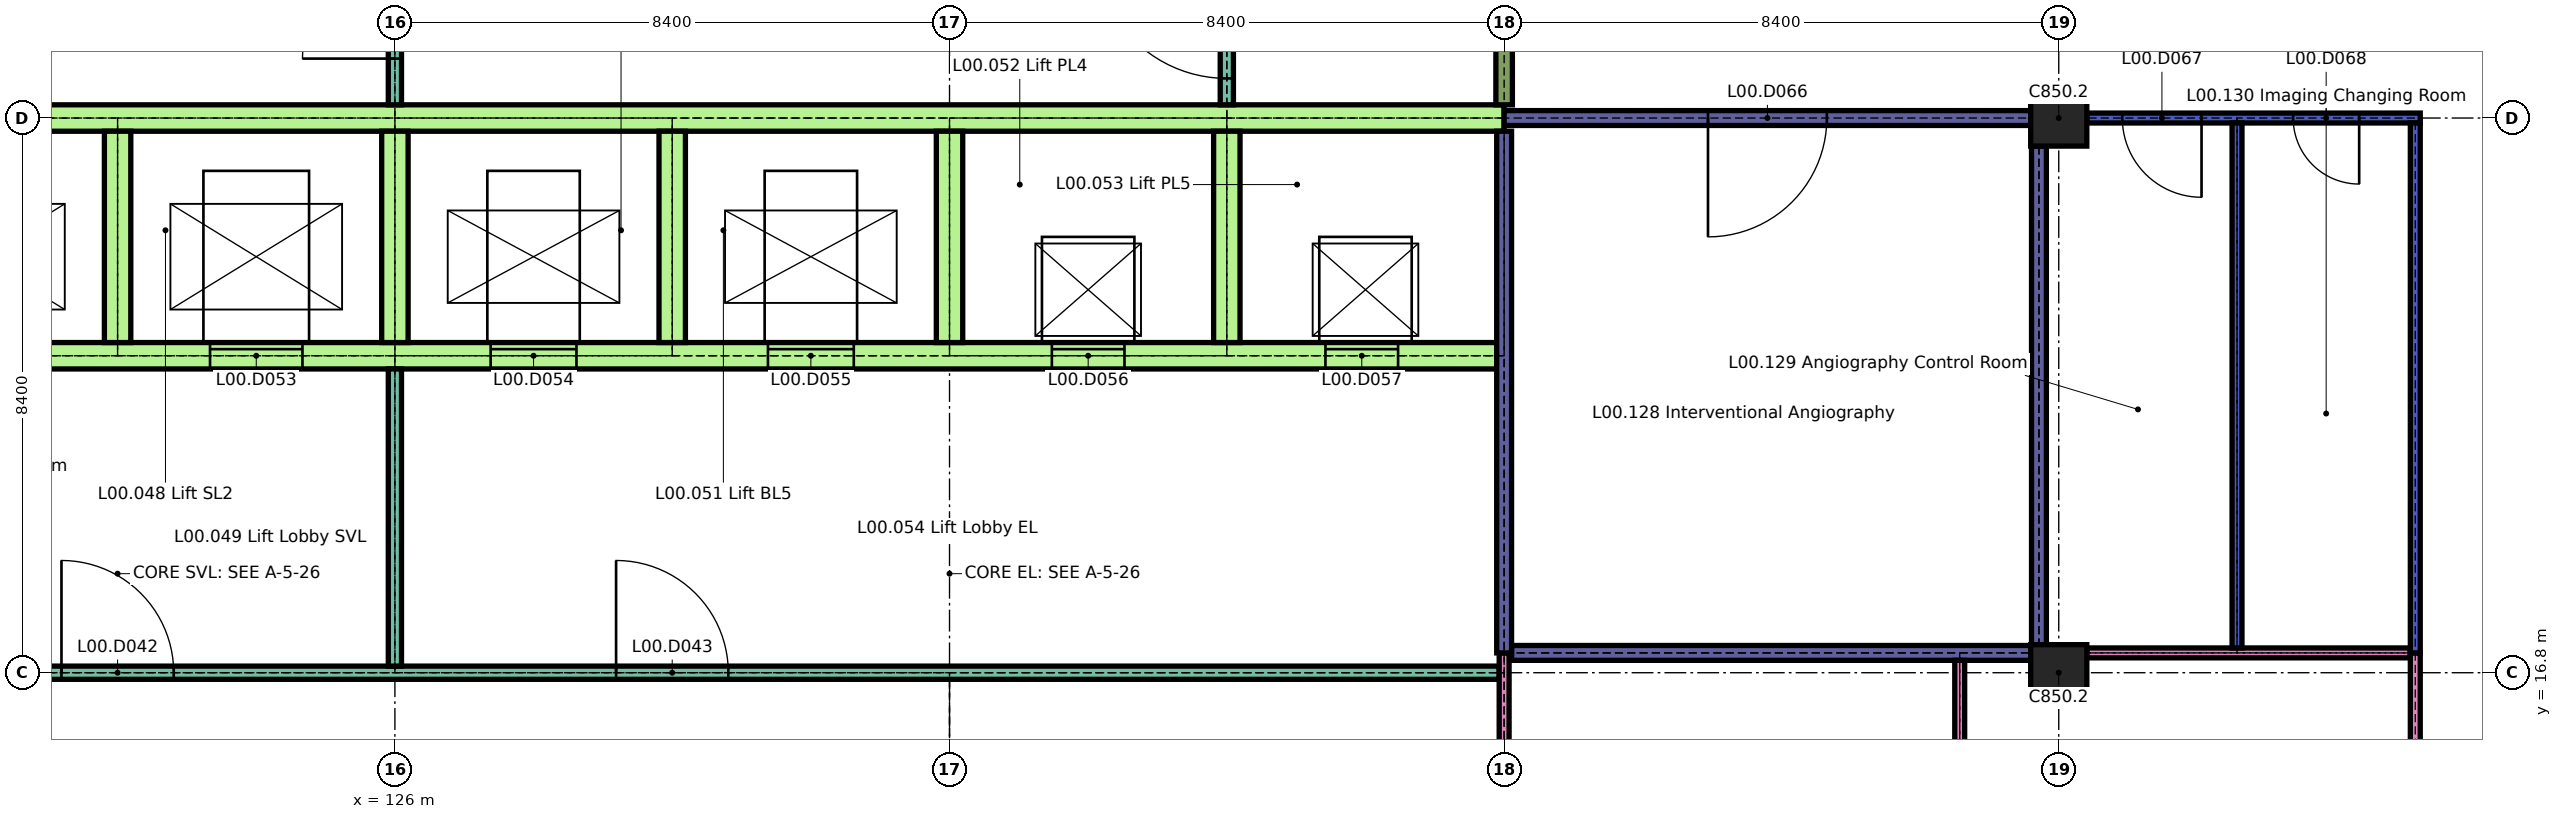
"""IFC4 building model, lengths in metres.
Left out: names, types, materials, properties, quantities, classifications, styles, units other than length and angle.
Written with IfcOpenShell. Run it as: python <this file> out.ifc"""

import sys

from ifc_helpers import new_model, si_unit, direction, frame, frame_2d, origin, origin_2d, place, context, subcontext, project, spatial, rectangle, extrude, element, fill, save


model = new_model("IFC4")
c1 = context("Model", 3, precision=1e-05, world=origin(), true_north=direction((0.0, 1.0)))
c2 = subcontext(c1, "Body", "Model", "MODEL_VIEW")
j1 = project(units=[si_unit("LENGTHUNIT", "METRE"), si_unit("PLANEANGLEUNIT", "RADIAN")], contexts=[c1])
p1 = place(None, origin())
s1 = spatial("IfcSite", under=j1, at=p1, CompositionType="ELEMENT")
p2 = place(p1, origin())
s2 = spatial("IfcBuilding", under=s1, at=p2, CompositionType="ELEMENT")
p3 = place(p2, origin())
s3 = spatial("IfcBuildingStorey", under=s2, at=p3, CompositionType="ELEMENT", Elevation=0.0)
for number, where, z_axis, x_axis in (
    (1, (151.2, 16.8, 0.0), (0.0, 0.0, 1.0), (1.0, 0.0, 0.0)),
    (2, (151.2, 25.2, 0.0), (0.0, 0.0, 1.0), (1.0, 0.0, 0.0)),
):
    element("IfcColumn", number, at=place(p3, frame(where, z_axis=z_axis, x_axis=x_axis)), inside=s3, PredefinedType="COLUMN", context=c2, shape_type="SweptSolid", body=[
        extrude(rectangle(XDim=0.85, YDim=0.85, at=origin_2d()), origin(), (0.0, 0.0, 1.0), 4.14),
    ])
p4 = place(p3, frame((117.6, 16.8, 0.0), z_axis=(0.0, 0.0, 1.0), x_axis=(1.0, 0.0, 0.0)))
e3 = element("IfcWall", 3, at=p4, inside=s3, PredefinedType="PARTITIONING", context=c2, shape_type="SweptSolid", body=[
    extrude(rectangle(XDim=25.125, YDim=0.2, at=frame_2d((12.562, 0.0))), origin(), (0.0, 0.0, 1.0), 4.14),
])
p5 = place(p4, frame((3.35, 0.0, 0.0)))
e4 = element("IfcOpeningElement", 4, at=p5, cuts=e3, PredefinedType="OPENING", context=c2, shape_type="SweptSolid", body=[
    extrude(rectangle(XDim=1.7, YDim=2.4, at=frame_2d((0.85, 1.2))), frame((0.0, 0.11, 0.0), z_axis=(0.0, -1.0, 0.0), x_axis=(1.0, 0.0, 0.0)), (0.0, 0.0, 1.0), 0.22),
])
p6 = place(p4, frame((11.75, 0.0, 0.0)))
e5 = element("IfcOpeningElement", 5, at=p6, cuts=e3, PredefinedType="OPENING", context=c2, shape_type="SweptSolid", body=[
    extrude(rectangle(XDim=1.7, YDim=2.4, at=frame_2d((0.85, 1.2))), frame((0.0, 0.11, 0.0), z_axis=(0.0, -1.0, 0.0), x_axis=(1.0, 0.0, 0.0)), (0.0, 0.0, 1.0), 0.22),
])
p7 = place(p3, frame((142.913, 17.1, 0.0), z_axis=(0.0, 0.0, 1.0), x_axis=(1.0, 0.0, 0.0)))
e6 = element("IfcWall", 6, at=p7, inside=s3, PredefinedType="SOLIDWALL", context=c2, shape_type="SweptSolid", body=[
    extrude(rectangle(XDim=7.862, YDim=0.225, at=frame_2d((3.931, 0.0))), origin(), (0.0, 0.0, 1.0), 4.14),
])
p8 = place(p3, frame((151.625, 17.1, 0.0), z_axis=(0.0, 0.0, 1.0), x_axis=(1.0, 0.0, 0.0)))
e7 = element("IfcWall", 7, at=p8, inside=s3, PredefinedType="PARTITIONING", context=c2, shape_type="SweptSolid", body=[
    extrude(rectangle(XDim=4.9, YDim=0.15, at=frame_2d((2.45, 0.0))), origin(), (0.0, 0.0, 1.0), 4.14),
])
p9 = place(p3, frame((117.7, 21.6, 0.0), z_axis=(0.0, 0.0, 1.0), x_axis=(1.0, 0.0, 0.0)))
e8 = element("IfcWall", 8, at=p9, inside=s3, PredefinedType="SHEAR", context=c2, shape_type="SweptSolid", body=[
    extrude(rectangle(XDim=24.988, YDim=0.4, at=frame_2d((12.494, 0.0))), origin(), (0.0, 0.0, 1.0), 4.14),
])
p10 = place(p9, frame((1.35, 0.0, 0.0)))
e9 = element("IfcOpeningElement", 9, at=p10, cuts=e8, PredefinedType="OPENING", context=c2, shape_type="SweptSolid", body=[
    extrude(rectangle(XDim=1.4, YDim=2.1, at=frame_2d((0.7, 1.05))), frame((0.0, 0.21, 0.0), z_axis=(0.0, -1.0, 0.0), x_axis=(1.0, 0.0, 0.0)), (0.0, 0.0, 1.0), 0.42),
])
p11 = place(p9, frame((5.5, 0.0, 0.0)))
e10 = element("IfcOpeningElement", 10, at=p11, cuts=e8, PredefinedType="OPENING", context=c2, shape_type="SweptSolid", body=[
    extrude(rectangle(XDim=1.4, YDim=2.1, at=frame_2d((0.7, 1.05))), frame((0.0, 0.21, 0.0), z_axis=(0.0, -1.0, 0.0), x_axis=(1.0, 0.0, 0.0)), (0.0, 0.0, 1.0), 0.42),
])
p12 = place(p9, frame((9.75, 0.0, 0.0)))
e11 = element("IfcOpeningElement", 11, at=p12, cuts=e8, PredefinedType="OPENING", context=c2, shape_type="SweptSolid", body=[
    extrude(rectangle(XDim=1.3, YDim=2.1, at=frame_2d((0.65, 1.05))), frame((0.0, 0.21, 0.0), z_axis=(0.0, -1.0, 0.0), x_axis=(1.0, 0.0, 0.0)), (0.0, 0.0, 1.0), 0.42),
])
p13 = place(p9, frame((13.95, 0.0, 0.0)))
e12 = element("IfcOpeningElement", 12, at=p13, cuts=e8, PredefinedType="OPENING", context=c2, shape_type="SweptSolid", body=[
    extrude(rectangle(XDim=1.3, YDim=2.1, at=frame_2d((0.65, 1.05))), frame((0.0, 0.21, 0.0), z_axis=(0.0, -1.0, 0.0), x_axis=(1.0, 0.0, 0.0)), (0.0, 0.0, 1.0), 0.42),
])
p14 = place(p9, frame((18.25, 0.0, 0.0)))
e13 = element("IfcOpeningElement", 13, at=p14, cuts=e8, PredefinedType="OPENING", context=c2, shape_type="SweptSolid", body=[
    extrude(rectangle(XDim=1.1, YDim=2.1, at=frame_2d((0.55, 1.05))), frame((0.0, 0.21, 0.0), z_axis=(0.0, -1.0, 0.0), x_axis=(1.0, 0.0, 0.0)), (0.0, 0.0, 1.0), 0.42),
])
p15 = place(p9, frame((22.394, 0.0, 0.0)))
e14 = element("IfcOpeningElement", 14, at=p15, cuts=e8, PredefinedType="OPENING", context=c2, shape_type="SweptSolid", body=[
    extrude(rectangle(XDim=1.1, YDim=2.1, at=frame_2d((0.55, 1.05))), frame((0.0, 0.21, 0.0), z_axis=(0.0, -1.0, 0.0), x_axis=(1.0, 0.0, 0.0)), (0.0, 0.0, 1.0), 0.42),
])
p16 = place(p3, frame((117.6, 25.2, 0.0), z_axis=(0.0, 0.0, 1.0), x_axis=(1.0, 0.0, 0.0)))
e15 = element("IfcWall", 15, at=p16, inside=s3, PredefinedType="SHEAR", context=c2, shape_type="SweptSolid", body=[
    extrude(rectangle(XDim=25.2, YDim=0.4, at=frame_2d((12.6, 0.0))), origin(), (0.0, 0.0, 1.0), 4.14),
])
p17 = place(p3, frame((142.8, 25.2, 0.0), z_axis=(0.0, 0.0, 1.0), x_axis=(1.0, 0.0, 0.0)))
e16 = element("IfcWall", 16, at=p17, inside=s3, PredefinedType="SOLIDWALL", context=c2, shape_type="SweptSolid", body=[
    extrude(rectangle(XDim=7.975, YDim=0.225, at=frame_2d((3.987, 0.0))), origin(), (0.0, 0.0, 1.0), 4.14),
])
p18 = place(p17, frame((3.087, 0.0, 0.0)))
e17 = element("IfcOpeningElement", 17, at=p18, cuts=e16, PredefinedType="OPENING", context=c2, shape_type="SweptSolid", body=[
    extrude(rectangle(XDim=1.8, YDim=2.4, at=frame_2d((0.9, 1.2))), frame((0.0, 0.123, 0.0), z_axis=(0.0, -1.0, 0.0), x_axis=(1.0, 0.0, 0.0)), (0.0, 0.0, 1.0), 0.245),
])
p19 = place(p3, frame((151.625, 25.2, 0.0), z_axis=(0.0, 0.0, 1.0), x_axis=(1.0, 0.0, 0.0)))
e18 = element("IfcWall", 18, at=p19, inside=s3, PredefinedType="PARTITIONING", context=c2, shape_type="SweptSolid", body=[
    extrude(rectangle(XDim=5.05, YDim=0.15, at=frame_2d((2.525, 0.0))), origin(), (0.0, 0.0, 1.0), 4.14),
])
p20 = place(p19, frame((0.538, 0.0, 0.0)))
e19 = element("IfcOpeningElement", 19, at=p20, cuts=e18, PredefinedType="OPENING", context=c2, shape_type="SweptSolid", body=[
    extrude(rectangle(XDim=1.2, YDim=2.1, at=frame_2d((0.6, 1.05))), frame((0.0, 0.085, 0.0), z_axis=(0.0, -1.0, 0.0), x_axis=(1.0, 0.0, 0.0)), (0.0, 0.0, 1.0), 0.17),
])
p21 = place(p19, frame((3.125, 0.0, 0.0)))
e20 = element("IfcOpeningElement", 20, at=p21, cuts=e18, PredefinedType="OPENING", context=c2, shape_type="SweptSolid", body=[
    extrude(rectangle(XDim=1.0, YDim=2.1, at=frame_2d((0.5, 1.05))), frame((0.0, 0.085, 0.0), z_axis=(0.0, -1.0, 0.0), x_axis=(1.0, 0.0, 0.0)), (0.0, 0.0, 1.0), 0.17),
])
p22 = place(p3, frame((121.8, 21.8, 0.0), z_axis=(0.0, 0.0, 1.0), x_axis=(0.0, 1.0, 0.0)))
e21 = element("IfcWall", 21, at=p22, inside=s3, PredefinedType="SHEAR", context=c2, shape_type="SweptSolid", body=[
    extrude(rectangle(XDim=3.2, YDim=0.4, at=frame_2d((1.6, 0.0))), origin(), (0.0, 0.0, 1.0), 4.14),
])
p23 = place(p3, frame((126.0, 16.9, 0.0), z_axis=(0.0, 0.0, 1.0), x_axis=(0.0, 1.0, 0.0)))
e22 = element("IfcWall", 22, at=p23, inside=s3, PredefinedType="PARTITIONING", context=c2, shape_type="SweptSolid", body=[
    extrude(rectangle(XDim=4.5, YDim=0.2, at=frame_2d((2.25, 0.0))), origin(), (0.0, 0.0, 1.0), 4.14),
])
p24 = place(p3, frame((126.0, 21.8, 0.0), z_axis=(0.0, 0.0, 1.0), x_axis=(0.0, 1.0, 0.0)))
e23 = element("IfcWall", 23, at=p24, inside=s3, PredefinedType="SHEAR", context=c2, shape_type="SweptSolid", body=[
    extrude(rectangle(XDim=3.2, YDim=0.4, at=frame_2d((1.6, 0.0))), origin(), (0.0, 0.0, 1.0), 4.14),
])
p25 = place(p3, frame((126.0, 25.4, 0.0), z_axis=(0.0, 0.0, 1.0), x_axis=(0.0, 1.0, 0.0)))
e24 = element("IfcWall", 24, at=p25, inside=s3, PredefinedType="PARTITIONING", context=c2, shape_type="SweptSolid", body=[
    extrude(rectangle(XDim=4.6, YDim=0.2, at=frame_2d((2.3, 0.0))), origin(), (0.0, 0.0, 1.0), 4.14),
])
p26 = place(p25, frame((0.7, 0.0, 0.0)))
e25 = element("IfcOpeningElement", 25, at=p26, cuts=e24, PredefinedType="OPENING", context=c2, shape_type="SweptSolid", body=[
    extrude(rectangle(XDim=1.4, YDim=2.1, at=frame_2d((0.7, 1.05))), frame((0.0, 0.11, 0.0), z_axis=(0.0, -1.0, 0.0), x_axis=(1.0, 0.0, 0.0)), (0.0, 0.0, 1.0), 0.22),
])
for number, where, z_axis, x_axis in (
    (26, (130.2, 21.8, 0.0), (0.0, 0.0, 1.0), (0.0, 1.0, 0.0)),
    (27, (134.4, 21.8, 0.0), (0.0, 0.0, 1.0), (0.0, 1.0, 0.0)),
    (28, (138.6, 21.8, 0.0), (0.0, 0.0, 1.0), (0.0, 1.0, 0.0)),
):
    element("IfcWall", number, at=place(p3, frame(where, z_axis=z_axis, x_axis=x_axis)), inside=s3, PredefinedType="SHEAR", context=c2, shape_type="SweptSolid", body=[
        extrude(rectangle(XDim=3.2, YDim=0.4, at=frame_2d((1.6, 0.0))), origin(), (0.0, 0.0, 1.0), 4.14),
    ])
p27 = place(p3, frame((138.6, 25.4, 0.0), z_axis=(0.0, 0.0, 1.0), x_axis=(0.0, 1.0, 0.0)))
e29 = element("IfcWall", 29, at=p27, inside=s3, PredefinedType="PARTITIONING", context=c2, shape_type="SweptSolid", body=[
    extrude(rectangle(XDim=4.6, YDim=0.2, at=frame_2d((2.3, 0.0))), origin(), (0.0, 0.0, 1.0), 4.14),
])
p28 = place(p27, frame((0.4, 0.0, 0.0)))
e30 = element("IfcOpeningElement", 30, at=p28, cuts=e29, PredefinedType="OPENING", context=c2, shape_type="SweptSolid", body=[
    extrude(rectangle(XDim=2.0, YDim=2.4, at=frame_2d((1.0, 1.2))), frame((0.0, 0.11, 0.0), z_axis=(0.0, -1.0, 0.0), x_axis=(1.0, 0.0, 0.0)), (0.0, 0.0, 1.0), 0.22),
])
p29 = place(p3, frame((142.8, 11.4, 0.0), z_axis=(0.0, 0.0, 1.0), x_axis=(0.0, 1.0, 0.0)))
e31 = element("IfcWall", 31, at=p29, inside=s3, PredefinedType="PARTITIONING", context=c2, shape_type="SweptSolid", body=[
    extrude(rectangle(XDim=5.7, YDim=0.15, at=frame_2d((2.85, 0.0))), origin(), (0.0, 0.0, 1.0), 4.14),
])
p30 = place(p3, frame((142.8, 17.1, 0.0), z_axis=(0.0, 0.0, 1.0), x_axis=(0.0, 1.0, 0.0)))
e32 = element("IfcWall", 32, at=p30, inside=s3, PredefinedType="SOLIDWALL", context=c2, shape_type="SweptSolid", body=[
    extrude(rectangle(XDim=7.9, YDim=0.225, at=frame_2d((3.95, 0.0))), origin(), (0.0, 0.0, 1.0), 4.14),
])
p31 = place(p3, frame((142.8, 25.4, 0.0), z_axis=(0.0, 0.0, 1.0), x_axis=(0.0, 1.0, 0.0)))
e33 = element("IfcWall", 33, at=p31, inside=s3, PredefinedType="SOLIDWALL", context=c2, shape_type="SweptSolid", body=[
    extrude(rectangle(XDim=4.6, YDim=0.25, at=frame_2d((2.3, 0.0))), origin(), (0.0, 0.0, 1.0), 4.14),
])
p32 = place(p3, frame((149.7, 11.475, 0.0), z_axis=(0.0, 0.0, 1.0), x_axis=(0.0, 1.0, 0.0)))
e34 = element("IfcWall", 34, at=p32, inside=s3, PredefinedType="PARTITIONING", context=c2, shape_type="SweptSolid", body=[
    extrude(rectangle(XDim=5.512, YDim=0.15, at=frame_2d((2.756, 0.0))), origin(), (0.0, 0.0, 1.0), 4.14),
])
p33 = place(p3, frame((150.9, 17.225, 0.0), z_axis=(0.0, 0.0, 1.0), x_axis=(0.0, 1.0, 0.0)))
e35 = element("IfcWall", 35, at=p33, inside=s3, PredefinedType="SOLIDWALL", context=c2, shape_type="SweptSolid", body=[
    extrude(rectangle(XDim=7.55, YDim=0.225, at=frame_2d((3.775, 0.0))), origin(), (0.0, 0.0, 1.0), 4.14),
])
p34 = place(p3, frame((153.9, 17.175, 0.0), z_axis=(0.0, 0.0, 1.0), x_axis=(0.0, 1.0, 0.0)))
e36 = element("IfcWall", 36, at=p34, inside=s3, PredefinedType="PARTITIONING", context=c2, shape_type="SweptSolid", body=[
    extrude(rectangle(XDim=7.95, YDim=0.15, at=frame_2d((3.975, 0.0))), origin(), (0.0, 0.0, 1.0), 4.14),
])
p35 = place(p3, frame((156.6, 11.475, 0.0), z_axis=(0.0, 0.0, 1.0), x_axis=(0.0, 1.0, 0.0)))
e37 = element("IfcWall", 37, at=p35, inside=s3, PredefinedType="PARTITIONING", context=c2, shape_type="SweptSolid", body=[
    extrude(rectangle(XDim=5.625, YDim=0.15, at=frame_2d((2.812, 0.0))), origin(), (0.0, 0.0, 1.0), 4.14),
])
p36 = place(p35, frame((2.212, 0.0, 0.0)))
e38 = element("IfcOpeningElement", 38, at=p36, cuts=e37, PredefinedType="OPENING", context=c2, shape_type="SweptSolid", body=[
    extrude(rectangle(XDim=1.2, YDim=2.1, at=frame_2d((0.6, 1.05))), frame((0.0, 0.085, 0.0), z_axis=(0.0, -1.0, 0.0), x_axis=(1.0, 0.0, 0.0)), (0.0, 0.0, 1.0), 0.17),
])
p37 = place(p3, frame((156.6, 17.1, 0.0), z_axis=(0.0, 0.0, 1.0), x_axis=(0.0, 1.0, 0.0)))
e39 = element("IfcWall", 39, at=p37, inside=s3, PredefinedType="PARTITIONING", context=c2, shape_type="SweptSolid", body=[
    extrude(rectangle(XDim=8.025, YDim=0.15, at=frame_2d((4.012, 0.0))), origin(), (0.0, 0.0, 1.0), 4.14),
])
p38 = place(p5, origin())
e40 = element("IfcDoor", 40, at=p38, inside=s3, OperationType="SINGLE_SWING_RIGHT", PredefinedType="DOOR", context=c2, shape_type="SweptSolid", body=[
    extrude(rectangle(XDim=1.7, YDim=2.4, at=frame_2d((0.85, 1.2))), frame((0.0, 0.025, 0.0), z_axis=(0.0, -1.0, 0.0), x_axis=(1.0, 0.0, 0.0)), (0.0, 0.0, 1.0), 0.05),
])
fill(e4, e40)
p39 = place(p6, origin())
e41 = element("IfcDoor", 41, at=p39, inside=s3, OperationType="SINGLE_SWING_RIGHT", PredefinedType="DOOR", context=c2, shape_type="SweptSolid", body=[
    extrude(rectangle(XDim=1.7, YDim=2.4, at=frame_2d((0.85, 1.2))), frame((0.0, 0.025, 0.0), z_axis=(0.0, -1.0, 0.0), x_axis=(1.0, 0.0, 0.0)), (0.0, 0.0, 1.0), 0.05),
])
fill(e5, e41)
p40 = place(p11, origin())
e42 = element("IfcDoor", 42, at=p40, inside=s3, OperationType="SLIDING_TO_LEFT", PredefinedType="DOOR", context=c2, shape_type="SweptSolid", body=[
    extrude(rectangle(XDim=1.4, YDim=2.1, at=frame_2d((0.7, 1.05))), frame((0.0, 0.025, 0.0), z_axis=(0.0, -1.0, 0.0), x_axis=(1.0, 0.0, 0.0)), (0.0, 0.0, 1.0), 0.05),
])
fill(e10, e42)
p41 = place(p12, origin())
e43 = element("IfcDoor", 43, at=p41, inside=s3, OperationType="SLIDING_TO_LEFT", PredefinedType="DOOR", context=c2, shape_type="SweptSolid", body=[
    extrude(rectangle(XDim=1.3, YDim=2.1, at=frame_2d((0.65, 1.05))), frame((0.0, 0.025, 0.0), z_axis=(0.0, -1.0, 0.0), x_axis=(1.0, 0.0, 0.0)), (0.0, 0.0, 1.0), 0.05),
])
fill(e11, e43)
p42 = place(p13, origin())
e44 = element("IfcDoor", 44, at=p42, inside=s3, OperationType="SLIDING_TO_LEFT", PredefinedType="DOOR", context=c2, shape_type="SweptSolid", body=[
    extrude(rectangle(XDim=1.3, YDim=2.1, at=frame_2d((0.65, 1.05))), frame((0.0, 0.025, 0.0), z_axis=(0.0, -1.0, 0.0), x_axis=(1.0, 0.0, 0.0)), (0.0, 0.0, 1.0), 0.05),
])
fill(e12, e44)
p43 = place(p14, origin())
e45 = element("IfcDoor", 45, at=p43, inside=s3, OperationType="SLIDING_TO_LEFT", PredefinedType="DOOR", context=c2, shape_type="SweptSolid", body=[
    extrude(rectangle(XDim=1.1, YDim=2.1, at=frame_2d((0.55, 1.05))), frame((0.0, 0.025, 0.0), z_axis=(0.0, -1.0, 0.0), x_axis=(1.0, 0.0, 0.0)), (0.0, 0.0, 1.0), 0.05),
])
fill(e13, e45)
p44 = place(p15, origin())
e46 = element("IfcDoor", 46, at=p44, inside=s3, OperationType="SLIDING_TO_LEFT", PredefinedType="DOOR", context=c2, shape_type="SweptSolid", body=[
    extrude(rectangle(XDim=1.1, YDim=2.1, at=frame_2d((0.55, 1.05))), frame((0.0, 0.025, 0.0), z_axis=(0.0, -1.0, 0.0), x_axis=(1.0, 0.0, 0.0)), (0.0, 0.0, 1.0), 0.05),
])
fill(e14, e46)
p45 = place(p18, origin())
e47 = element("IfcDoor", 47, at=p45, inside=s3, OperationType="SINGLE_SWING_LEFT", PredefinedType="DOOR", context=c2, shape_type="SweptSolid", body=[
    extrude(rectangle(XDim=1.8, YDim=2.4, at=frame_2d((0.9, 1.2))), frame((0.0, 0.04, 0.0), z_axis=(0.0, -1.0, 0.0), x_axis=(1.0, 0.0, 0.0)), (0.0, 0.0, 1.0), 0.08),
])
fill(e17, e47)
p46 = place(p20, origin())
e48 = element("IfcDoor", 48, at=p46, inside=s3, OperationType="SINGLE_SWING_RIGHT", PredefinedType="DOOR", context=c2, shape_type="SweptSolid", body=[
    extrude(rectangle(XDim=1.2, YDim=2.1, at=frame_2d((0.6, 1.05))), frame((0.0, 0.025, 0.0), z_axis=(0.0, -1.0, 0.0), x_axis=(1.0, 0.0, 0.0)), (0.0, 0.0, 1.0), 0.05),
])
fill(e19, e48)
p47 = place(p21, origin())
e49 = element("IfcDoor", 49, at=p47, inside=s3, OperationType="SINGLE_SWING_RIGHT", PredefinedType="DOOR", context=c2, shape_type="SweptSolid", body=[
    extrude(rectangle(XDim=1.0, YDim=2.1, at=frame_2d((0.5, 1.05))), frame((0.0, 0.025, 0.0), z_axis=(0.0, -1.0, 0.0), x_axis=(1.0, 0.0, 0.0)), (0.0, 0.0, 1.0), 0.05),
])
fill(e20, e49)
p48 = place(p26, origin())
e50 = element("IfcDoor", 50, at=p48, inside=s3, OperationType="SINGLE_SWING_RIGHT", PredefinedType="DOOR", context=c2, shape_type="SweptSolid", body=[
    extrude(rectangle(XDim=1.4, YDim=2.1, at=frame_2d((0.7, 1.05))), frame((0.0, 0.03, 0.0), z_axis=(0.0, -1.0, 0.0), x_axis=(1.0, 0.0, 0.0)), (0.0, 0.0, 1.0), 0.06),
])
fill(e25, e50)
p49 = place(p28, origin())
e51 = element("IfcDoor", 51, at=p49, inside=s3, OperationType="SINGLE_SWING_LEFT", PredefinedType="DOOR", context=c2, shape_type="SweptSolid", body=[
    extrude(rectangle(XDim=2.0, YDim=2.4, at=frame_2d((1.0, 1.2))), frame((0.0, 0.03, 0.0), z_axis=(0.0, -1.0, 0.0), x_axis=(1.0, 0.0, 0.0)), (0.0, 0.0, 1.0), 0.06),
])
fill(e30, e51)
save(model, sys.argv[1])
